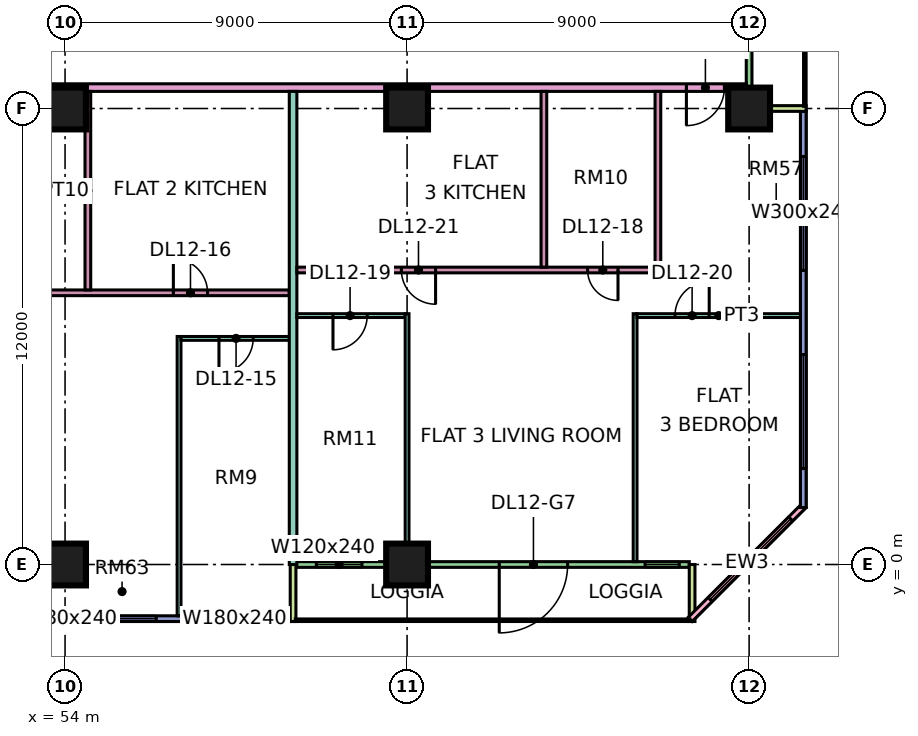
"""IFC4 building model, lengths in metres.
Left out: names, types, materials, properties, quantities, classifications, styles, units other than length and angle.
Written with IfcOpenShell. Run it as: python <this file> out.ifc"""

import sys

from ifc_helpers import new_model, si_unit, direction, frame, frame_2d, origin, origin_2d, place, context, subcontext, project, spatial, rectangle, extrude, element, fill, save


model = new_model("IFC4")
c1 = context("Model", 3, precision=1e-05, world=origin(), true_north=direction((0.0, 1.0)))
c2 = subcontext(c1, "Body", "Model", "MODEL_VIEW")
j1 = project(units=[si_unit("LENGTHUNIT", "METRE"), si_unit("PLANEANGLEUNIT", "RADIAN")], contexts=[c1])
p1 = place(None, origin())
s1 = spatial("IfcSite", under=j1, at=p1, CompositionType="ELEMENT")
p2 = place(p1, origin())
s2 = spatial("IfcBuilding", under=s1, at=p2, CompositionType="ELEMENT")
p3 = place(p2, frame((0.0, 0.0, 60.15)))
s3 = spatial("IfcBuildingStorey", under=s2, at=p3, CompositionType="ELEMENT", Elevation=60.15)
for number, where, z_axis, x_axis in (
    (1, (54.0, 0.0, 0.0), (0.0, 0.0, 1.0), (1.0, 0.0, 0.0)),
    (2, (54.0, 12.0, 0.0), (0.0, 0.0, 1.0), (1.0, 0.0, 0.0)),
    (3, (63.0, 0.0, 0.0), (0.0, 0.0, 1.0), (1.0, 0.0, 0.0)),
    (4, (63.0, 12.0, 0.0), (0.0, 0.0, 1.0), (1.0, 0.0, 0.0)),
    (5, (72.0, 12.0, 0.0), (0.0, 0.0, 1.0), (1.0, 0.0, 0.0)),
):
    element("IfcColumn", number, at=place(p3, frame(where, z_axis=z_axis, x_axis=x_axis)), inside=s3, PredefinedType="COLUMN", context=c2, shape_type="SweptSolid", body=[
        extrude(rectangle(XDim=1.1, YDim=1.1, at=origin_2d()), origin(), (0.0, 0.0, 1.0), 3.75),
    ])
p4 = place(p3, frame((48.075, -1.425, 0.0), z_axis=(0.0, 0.0, 1.0), x_axis=(1.0, 0.0, 0.0)))
e6 = element("IfcWall", 6, at=p4, inside=s3, PredefinedType="SOLIDWALL", context=c2, shape_type="SweptSolid", body=[
    extrude(rectangle(XDim=11.85, YDim=0.15, at=frame_2d((5.925, 0.0))), origin(), (0.0, 0.0, 1.0), 3.35),
])
p5 = place(p4, frame((0.562, 0.0, 0.45)))
e7 = element("IfcOpeningElement", 7, at=p5, cuts=e6, PredefinedType="OPENING", context=c2, shape_type="SweptSolid", body=[
    extrude(rectangle(XDim=1.8, YDim=2.4, at=frame_2d((0.9, 1.2))), frame((0.0, 0.085, 0.0), z_axis=(0.0, -1.0, 0.0), x_axis=(1.0, 0.0, 0.0)), (0.0, 0.0, 1.0), 0.17),
])
p6 = place(p4, frame((3.525, 0.0, 0.45)))
e8 = element("IfcOpeningElement", 8, at=p6, cuts=e6, PredefinedType="OPENING", context=c2, shape_type="SweptSolid", body=[
    extrude(rectangle(XDim=4.8, YDim=2.4, at=frame_2d((2.4, 1.2))), frame((0.0, 0.085, 0.0), z_axis=(0.0, -1.0, 0.0), x_axis=(1.0, 0.0, 0.0)), (0.0, 0.0, 1.0), 0.17),
])
p7 = place(p4, frame((9.488, 0.0, 0.45)))
e9 = element("IfcOpeningElement", 9, at=p7, cuts=e6, PredefinedType="OPENING", context=c2, shape_type="SweptSolid", body=[
    extrude(rectangle(XDim=1.8, YDim=2.4, at=frame_2d((0.9, 1.2))), frame((0.0, 0.085, 0.0), z_axis=(0.0, -1.0, 0.0), x_axis=(1.0, 0.0, 0.0)), (0.0, 0.0, 1.0), 0.17),
])
p8 = place(p3, frame((60.075, 0.0, 0.0), z_axis=(0.0, 0.0, 1.0), x_axis=(1.0, 0.0, 0.0)))
e10 = element("IfcWall", 10, at=p8, inside=s3, PredefinedType="SOLIDWALL", context=c2, shape_type="SweptSolid", body=[
    extrude(rectangle(XDim=10.35, YDim=0.15, at=frame_2d((5.175, 0.0))), origin(), (0.0, 0.0, 1.0), 3.35),
])
p9 = place(p8, frame((0.538, 0.0, 0.45)))
e11 = element("IfcOpeningElement", 11, at=p9, cuts=e10, PredefinedType="OPENING", context=c2, shape_type="SweptSolid", body=[
    extrude(rectangle(XDim=1.2, YDim=2.4, at=frame_2d((0.6, 1.2))), frame((0.0, 0.085, 0.0), z_axis=(0.0, -1.0, 0.0), x_axis=(1.0, 0.0, 0.0)), (0.0, 0.0, 1.0), 0.17),
])
p10 = place(p8, frame((5.35, 0.0, 0.0)))
e12 = element("IfcOpeningElement", 12, at=p10, cuts=e10, PredefinedType="OPENING", context=c2, shape_type="SweptSolid", body=[
    extrude(rectangle(XDim=1.8, YDim=2.4, at=frame_2d((0.9, 1.2))), frame((0.0, 0.085, 0.0), z_axis=(0.0, -1.0, 0.0), x_axis=(1.0, 0.0, 0.0)), (0.0, 0.0, 1.0), 0.17),
])
p11 = place(p8, frame((9.188, 0.0, 0.45)))
e13 = element("IfcOpeningElement", 13, at=p11, cuts=e10, PredefinedType="OPENING", context=c2, shape_type="SweptSolid", body=[
    extrude(rectangle(XDim=0.9, YDim=2.4, at=frame_2d((0.45, 1.2))), frame((0.0, 0.085, 0.0), z_axis=(0.0, -1.0, 0.0), x_axis=(1.0, 0.0, 0.0)), (0.0, 0.0, 1.0), 0.17),
])
for number, where, z_axis, x_axis in (
    (14, (60.0, -1.5, 0.0), (0.0, 0.0, 1.0), (0.0, 1.0, 0.0)),
    (15, (70.5, -1.5, 0.0), (0.0, 0.0, 1.0), (0.0, 1.0, 0.0)),
):
    element("IfcWall", number, at=place(p3, frame(where, z_axis=z_axis, x_axis=x_axis)), inside=s3, PredefinedType="SOLIDWALL", context=c2, shape_type="SweptSolid", body=[
        extrude(rectangle(XDim=1.5, YDim=0.15, at=frame_2d((0.75, 0.0))), origin(), (0.0, 0.0, 1.0), 3.35),
    ])
p12 = place(p3, frame((70.447, -1.447, 0.0), z_axis=(0.0, 0.0, 1.0), x_axis=(0.707106781187, 0.707106781187, 0.0)))
e16 = element("IfcWall", 16, at=p12, inside=s3, PredefinedType="SOLIDWALL", context=c2, shape_type="SweptSolid", body=[
    extrude(rectangle(XDim=4.243, YDim=0.15, at=frame_2d((2.121, 0.0))), origin(), (0.0, 0.0, 1.0), 3.35),
])
p13 = place(p12, frame((0.744, 0.0, 0.45)))
e17 = element("IfcOpeningElement", 17, at=p13, cuts=e16, PredefinedType="OPENING", context=c2, shape_type="SweptSolid", body=[
    extrude(rectangle(XDim=3.0, YDim=2.4, at=frame_2d((1.5, 1.2))), frame((0.0, 0.085, 0.0), z_axis=(0.0, -1.0, 0.0), x_axis=(1.0, 0.0, 0.0)), (0.0, 0.0, 1.0), 0.17),
])
p14 = place(p3, frame((73.425, 1.5, 0.0), z_axis=(0.0, 0.0, 1.0), x_axis=(0.0, 1.0, 0.0)))
e18 = element("IfcWall", 18, at=p14, inside=s3, PredefinedType="SOLIDWALL", context=c2, shape_type="SweptSolid", body=[
    extrude(rectangle(XDim=10.425, YDim=0.15, at=frame_2d((5.212, 0.0))), origin(), (0.0, 0.0, 1.0), 3.35),
])
p15 = place(p14, frame((1.025, 0.0, 0.45)))
e19 = element("IfcOpeningElement", 19, at=p15, cuts=e18, PredefinedType="OPENING", context=c2, shape_type="SweptSolid", body=[
    extrude(rectangle(XDim=3.0, YDim=2.4, at=frame_2d((1.5, 1.2))), frame((0.0, 0.085, 0.0), z_axis=(0.0, -1.0, 0.0), x_axis=(1.0, 0.0, 0.0)), (0.0, 0.0, 1.0), 0.17),
])
p16 = place(p14, frame((6.238, 0.0, 0.45)))
e20 = element("IfcOpeningElement", 20, at=p16, cuts=e18, PredefinedType="OPENING", context=c2, shape_type="SweptSolid", body=[
    extrude(rectangle(XDim=3.0, YDim=2.4, at=frame_2d((1.5, 1.2))), frame((0.0, 0.085, 0.0), z_axis=(0.0, -1.0, 0.0), x_axis=(1.0, 0.0, 0.0)), (0.0, 0.0, 1.0), 0.17),
])
p17 = place(p3, frame((72.0, 12.075, 0.0), z_axis=(0.0, 0.0, 1.0), x_axis=(0.0, 1.0, 0.0)))
e21 = element("IfcWall", 21, at=p17, inside=s3, PredefinedType="SOLIDWALL", context=c2, shape_type="SweptSolid", body=[
    extrude(rectangle(XDim=10.35, YDim=0.15, at=frame_2d((5.175, 0.0))), origin(), (0.0, 0.0, 1.0), 3.35),
])
p18 = place(p17, frame((4.275, 0.0, 1.7)))
e22 = element("IfcOpeningElement", 22, at=p18, cuts=e21, PredefinedType="OPENING", context=c2, shape_type="SweptSolid", body=[
    extrude(rectangle(XDim=1.2, YDim=0.9, at=frame_2d((0.6, 0.45))), frame((0.0, 0.085, 0.0), z_axis=(0.0, -1.0, 0.0), x_axis=(1.0, 0.0, 0.0)), (0.0, 0.0, 1.0), 0.17),
])
p19 = place(p17, frame((7.988, 0.0, 0.45)))
e23 = element("IfcOpeningElement", 23, at=p19, cuts=e21, PredefinedType="OPENING", context=c2, shape_type="SweptSolid", body=[
    extrude(rectangle(XDim=1.8, YDim=2.4, at=frame_2d((0.9, 1.2))), frame((0.0, 0.085, 0.0), z_axis=(0.0, -1.0, 0.0), x_axis=(1.0, 0.0, 0.0)), (0.0, 0.0, 1.0), 0.17),
])
p20 = place(p3, frame((73.5, 12.0, 0.0), z_axis=(0.0, 0.0, 1.0), x_axis=(-1.0, 0.0, 0.0)))
e24 = element("IfcWall", 24, at=p20, inside=s3, PredefinedType="SOLIDWALL", context=c2, shape_type="SweptSolid", body=[
    extrude(rectangle(XDim=1.5, YDim=0.15, at=frame_2d((0.75, 0.0))), origin(), (0.0, 0.0, 1.0), 3.35),
])
p21 = place(p3, frame((40.65, 12.55, 0.0), z_axis=(0.0, 0.0, 1.0), x_axis=(1.0, 0.0, 0.0)))
e25 = element("IfcWall", 25, at=p21, inside=s3, PredefinedType="PARTITIONING", context=c2, shape_type="SweptSolid", body=[
    extrude(rectangle(XDim=31.276, YDim=0.2, at=frame_2d((15.638, 0.0))), origin(), (0.0, 0.0, 1.0), 3.35),
])
p22 = place(p21, frame((8.4, 0.0, 0.0)))
e26 = element("IfcOpeningElement", 26, at=p22, cuts=e25, PredefinedType="OPENING", context=c2, shape_type="SweptSolid", body=[
    extrude(rectangle(XDim=1.0, YDim=2.1, at=frame_2d((0.5, 1.05))), frame((0.0, 0.11, 0.0), z_axis=(0.0, -1.0, 0.0), x_axis=(1.0, 0.0, 0.0)), (0.0, 0.0, 1.0), 0.22),
])
p23 = place(p21, frame((29.7, 0.0, 0.0)))
e27 = element("IfcOpeningElement", 27, at=p23, cuts=e25, PredefinedType="OPENING", context=c2, shape_type="SweptSolid", body=[
    extrude(rectangle(XDim=1.0, YDim=2.1, at=frame_2d((0.5, 1.05))), frame((0.0, 0.11, 0.0), z_axis=(0.0, -1.0, 0.0), x_axis=(1.0, 0.0, 0.0)), (0.0, 0.0, 1.0), 0.22),
])
p24 = place(p21, frame((1.05, 0.0, 0.0)))
e28 = element("IfcOpeningElement", 28, at=p24, cuts=e25, PredefinedType="OPENING", context=c2, shape_type="SweptSolid", body=[
    extrude(rectangle(XDim=1.0, YDim=2.1, at=frame_2d((0.5, 1.05))), frame((0.0, 0.11, 0.0), z_axis=(0.0, -1.0, 0.0), x_axis=(1.0, 0.0, 0.0)), (0.0, 0.0, 1.0), 0.22),
])
p25 = place(p3, frame((50.925, 7.15, 0.0), z_axis=(0.0, 0.0, 1.0), x_axis=(1.0, 0.0, 0.0)))
e29 = element("IfcWall", 29, at=p25, inside=s3, PredefinedType="PARTITIONING", context=c2, shape_type="SweptSolid", body=[
    extrude(rectangle(XDim=8.975, YDim=0.15, at=frame_2d((4.487, 0.0))), origin(), (0.0, 0.0, 1.0), 3.35),
])
p26 = place(p25, frame((5.925, 0.0, 0.0)))
e30 = element("IfcOpeningElement", 30, at=p26, cuts=e29, PredefinedType="OPENING", context=c2, shape_type="SweptSolid", body=[
    extrude(rectangle(XDim=0.9, YDim=2.1, at=frame_2d((0.45, 1.05))), frame((0.0, 0.085, 0.0), z_axis=(0.0, -1.0, 0.0), x_axis=(1.0, 0.0, 0.0)), (0.0, 0.0, 1.0), 0.17),
])
p27 = place(p3, frame((54.6, 7.225, 0.0), z_axis=(0.0, 0.0, 1.0), x_axis=(0.0, 1.0, 0.0)))
e31 = element("IfcWall", 31, at=p27, inside=s3, PredefinedType="PARTITIONING", context=c2, shape_type="SweptSolid", body=[
    extrude(rectangle(XDim=5.225, YDim=0.15, at=frame_2d((2.612, 0.0))), origin(), (0.0, 0.0, 1.0), 3.35),
])
p28 = place(p3, frame((57.0, -1.35, 0.0), z_axis=(0.0, 0.0, 1.0), x_axis=(0.0, 1.0, 0.0)))
e32 = element("IfcWall", 32, at=p28, inside=s3, PredefinedType="PARTITIONING", context=c2, shape_type="SweptSolid", body=[
    extrude(rectangle(XDim=7.35, YDim=0.1, at=frame_2d((3.675, 0.0))), origin(), (0.0, 0.0, 1.0), 3.35),
])
p29 = place(p3, frame((57.05, 5.95, 0.0), z_axis=(0.0, 0.0, 1.0), x_axis=(1.0, 0.0, 0.0)))
e33 = element("IfcWall", 33, at=p29, inside=s3, PredefinedType="PARTITIONING", context=c2, shape_type="SweptSolid", body=[
    extrude(rectangle(XDim=2.85, YDim=0.1, at=frame_2d((1.425, 0.0))), origin(), (0.0, 0.0, 1.0), 3.35),
])
p30 = place(p29, frame((1.0, 0.0, 0.0)))
e34 = element("IfcOpeningElement", 34, at=p30, cuts=e33, PredefinedType="OPENING", context=c2, shape_type="SweptSolid", body=[
    extrude(rectangle(XDim=0.9, YDim=2.1, at=frame_2d((0.45, 1.05))), frame((0.0, 0.06, 0.0), z_axis=(0.0, -1.0, 0.0), x_axis=(1.0, 0.0, 0.0)), (0.0, 0.0, 1.0), 0.12),
])
p31 = place(p3, frame((60.0, 0.0, 0.0), z_axis=(0.0, 0.0, 1.0), x_axis=(0.0, 1.0, 0.0)))
e35 = element("IfcWall", 35, at=p31, inside=s3, PredefinedType="PARTITIONING", context=c2, shape_type="SweptSolid", body=[
    extrude(rectangle(XDim=12.45, YDim=0.2, at=frame_2d((6.225, 0.0))), origin(), (0.0, 0.0, 1.0), 3.35),
])
p32 = place(p3, frame((60.1, 6.55, 0.0), z_axis=(0.0, 0.0, 1.0), x_axis=(1.0, 0.0, 0.0)))
e36 = element("IfcWall", 36, at=p32, inside=s3, PredefinedType="PARTITIONING", context=c2, shape_type="SweptSolid", body=[
    extrude(rectangle(XDim=2.85, YDim=0.1, at=frame_2d((1.425, 0.0))), origin(), (0.0, 0.0, 1.0), 3.35),
])
p33 = place(p32, frame((0.95, 0.0, 0.0)))
e37 = element("IfcOpeningElement", 37, at=p33, cuts=e36, PredefinedType="OPENING", context=c2, shape_type="SweptSolid", body=[
    extrude(rectangle(XDim=0.9, YDim=2.1, at=frame_2d((0.45, 1.05))), frame((0.0, 0.06, 0.0), z_axis=(0.0, -1.0, 0.0), x_axis=(1.0, 0.0, 0.0)), (0.0, 0.0, 1.0), 0.12),
])
p34 = place(p3, frame((60.1, 7.75, 0.0), z_axis=(0.0, 0.0, 1.0), x_axis=(1.0, 0.0, 0.0)))
e38 = element("IfcWall", 38, at=p34, inside=s3, PredefinedType="PARTITIONING", context=c2, shape_type="SweptSolid", body=[
    extrude(rectangle(XDim=9.575, YDim=0.15, at=frame_2d((4.788, 0.0))), origin(), (0.0, 0.0, 1.0), 3.35),
])
p35 = place(p34, frame((7.65, 0.0, 0.0)))
e39 = element("IfcOpeningElement", 39, at=p35, cuts=e38, PredefinedType="OPENING", context=c2, shape_type="SweptSolid", body=[
    extrude(rectangle(XDim=0.8, YDim=2.1, at=frame_2d((0.4, 1.05))), frame((0.0, 0.085, 0.0), z_axis=(0.0, -1.0, 0.0), x_axis=(1.0, 0.0, 0.0)), (0.0, 0.0, 1.0), 0.17),
])
p36 = place(p34, frame((2.75, 0.0, 0.0)))
e40 = element("IfcOpeningElement", 40, at=p36, cuts=e38, PredefinedType="OPENING", context=c2, shape_type="SweptSolid", body=[
    extrude(rectangle(XDim=0.9, YDim=2.1, at=frame_2d((0.45, 1.05))), frame((0.0, 0.085, 0.0), z_axis=(0.0, -1.0, 0.0), x_axis=(1.0, 0.0, 0.0)), (0.0, 0.0, 1.0), 0.17),
])
p37 = place(p3, frame((63.0, 0.074, 0.0), z_axis=(0.0, 0.0, 1.0), x_axis=(0.0, 1.0, 0.0)))
e41 = element("IfcWall", 41, at=p37, inside=s3, PredefinedType="PARTITIONING", context=c2, shape_type="SweptSolid", body=[
    extrude(rectangle(XDim=6.526, YDim=0.1, at=frame_2d((3.263, 0.0))), origin(), (0.0, 0.0, 1.0), 3.35),
])
p38 = place(p3, frame((66.6, 7.825, 0.0), z_axis=(0.0, 0.0, 1.0), x_axis=(0.0, 1.0, 0.0)))
e42 = element("IfcWall", 42, at=p38, inside=s3, PredefinedType="PARTITIONING", context=c2, shape_type="SweptSolid", body=[
    extrude(rectangle(XDim=4.625, YDim=0.15, at=frame_2d((2.312, 0.0))), origin(), (0.0, 0.0, 1.0), 3.35),
])
p39 = place(p3, frame((69.0, 0.074, 0.0), z_axis=(0.0, 0.0, 1.0), x_axis=(0.0, 1.0, 0.0)))
e43 = element("IfcWall", 43, at=p39, inside=s3, PredefinedType="PARTITIONING", context=c2, shape_type="SweptSolid", body=[
    extrude(rectangle(XDim=6.526, YDim=0.1, at=frame_2d((3.263, 0.0))), origin(), (0.0, 0.0, 1.0), 3.35),
])
p40 = place(p3, frame((69.05, 6.55, 0.0), z_axis=(0.0, 0.0, 1.0), x_axis=(1.0, 0.0, 0.0)))
e44 = element("IfcWall", 44, at=p40, inside=s3, PredefinedType="PARTITIONING", context=c2, shape_type="SweptSolid", body=[
    extrude(rectangle(XDim=4.3, YDim=0.1, at=frame_2d((2.15, 0.0))), origin(), (0.0, 0.0, 1.0), 3.35),
])
p41 = place(p40, frame((1.0, 0.0, 0.0)))
e45 = element("IfcOpeningElement", 45, at=p41, cuts=e44, PredefinedType="OPENING", context=c2, shape_type="SweptSolid", body=[
    extrude(rectangle(XDim=0.9, YDim=2.1, at=frame_2d((0.45, 1.05))), frame((0.0, 0.06, 0.0), z_axis=(0.0, -1.0, 0.0), x_axis=(1.0, 0.0, 0.0)), (0.0, 0.0, 1.0), 0.12),
])
p42 = place(p3, frame((69.6, 7.825, 0.0), z_axis=(0.0, 0.0, 1.0), x_axis=(0.0, 1.0, 0.0)))
e46 = element("IfcWall", 46, at=p42, inside=s3, PredefinedType="PARTITIONING", context=c2, shape_type="SweptSolid", body=[
    extrude(rectangle(XDim=4.625, YDim=0.15, at=frame_2d((2.312, 0.0))), origin(), (0.0, 0.0, 1.0), 3.35),
])
p43 = place(p6, origin())
e47 = element("IfcWindow", 47, at=p43, inside=s3, PartitioningType="SINGLE_PANEL", PredefinedType="WINDOW", context=c2, shape_type="SweptSolid", body=[
    extrude(rectangle(XDim=4.8, YDim=2.4, at=frame_2d((2.4, 1.2))), frame((0.0, 0.03, 0.0), z_axis=(0.0, -1.0, 0.0), x_axis=(1.0, 0.0, 0.0)), (0.0, 0.0, 1.0), 0.06),
])
fill(e8, e47)
p44 = place(p7, origin())
e48 = element("IfcWindow", 48, at=p44, inside=s3, PartitioningType="SINGLE_PANEL", PredefinedType="WINDOW", context=c2, shape_type="SweptSolid", body=[
    extrude(rectangle(XDim=1.8, YDim=2.4, at=frame_2d((0.9, 1.2))), frame((0.0, 0.03, 0.0), z_axis=(0.0, -1.0, 0.0), x_axis=(1.0, 0.0, 0.0)), (0.0, 0.0, 1.0), 0.06),
])
fill(e9, e48)
p45 = place(p9, origin())
e49 = element("IfcWindow", 49, at=p45, inside=s3, PartitioningType="SINGLE_PANEL", PredefinedType="WINDOW", context=c2, shape_type="SweptSolid", body=[
    extrude(rectangle(XDim=1.2, YDim=2.4, at=frame_2d((0.6, 1.2))), frame((0.0, 0.03, 0.0), z_axis=(0.0, -1.0, 0.0), x_axis=(1.0, 0.0, 0.0)), (0.0, 0.0, 1.0), 0.06),
])
fill(e11, e49)
p46 = place(p10, frame((1.8, 0.0, 0.0), z_axis=(0.0, 0.0, 1.0), x_axis=(-1.0, 0.0, 0.0)))
e50 = element("IfcDoor", 50, at=p46, inside=s3, OperationType="DOUBLE_DOOR_SINGLE_SWING", PredefinedType="DOOR", context=c2, shape_type="SweptSolid", body=[
    extrude(rectangle(XDim=1.8, YDim=2.4, at=frame_2d((0.9, 1.2))), frame((0.0, 0.025, 0.0), z_axis=(0.0, -1.0, 0.0), x_axis=(1.0, 0.0, 0.0)), (0.0, 0.0, 1.0), 0.05),
])
fill(e12, e50)
p47 = place(p11, origin())
e51 = element("IfcWindow", 51, at=p47, inside=s3, PartitioningType="SINGLE_PANEL", PredefinedType="WINDOW", context=c2, shape_type="SweptSolid", body=[
    extrude(rectangle(XDim=0.9, YDim=2.4, at=frame_2d((0.45, 1.2))), frame((0.0, 0.03, 0.0), z_axis=(0.0, -1.0, 0.0), x_axis=(1.0, 0.0, 0.0)), (0.0, 0.0, 1.0), 0.06),
])
fill(e13, e51)
p48 = place(p13, origin())
e52 = element("IfcWindow", 52, at=p48, inside=s3, PartitioningType="SINGLE_PANEL", PredefinedType="WINDOW", context=c2, shape_type="SweptSolid", body=[
    extrude(rectangle(XDim=3.0, YDim=2.4, at=frame_2d((1.5, 1.2))), frame((0.0, 0.03, 0.0), z_axis=(0.0, -1.0, 0.0), x_axis=(1.0, 0.0, 0.0)), (0.0, 0.0, 1.0), 0.06),
])
fill(e17, e52)
p49 = place(p15, origin())
e53 = element("IfcWindow", 53, at=p49, inside=s3, PartitioningType="SINGLE_PANEL", PredefinedType="WINDOW", context=c2, shape_type="SweptSolid", body=[
    extrude(rectangle(XDim=3.0, YDim=2.4, at=frame_2d((1.5, 1.2))), frame((0.0, 0.03, 0.0), z_axis=(0.0, -1.0, 0.0), x_axis=(1.0, 0.0, 0.0)), (0.0, 0.0, 1.0), 0.06),
])
fill(e19, e53)
p50 = place(p16, origin())
e54 = element("IfcWindow", 54, at=p50, inside=s3, PartitioningType="SINGLE_PANEL", PredefinedType="WINDOW", context=c2, shape_type="SweptSolid", body=[
    extrude(rectangle(XDim=3.0, YDim=2.4, at=frame_2d((1.5, 1.2))), frame((0.0, 0.03, 0.0), z_axis=(0.0, -1.0, 0.0), x_axis=(1.0, 0.0, 0.0)), (0.0, 0.0, 1.0), 0.06),
])
fill(e20, e54)
p51 = place(p30, frame((0.9, 0.0, 0.0), z_axis=(0.0, 0.0, 1.0), x_axis=(-1.0, 0.0, 0.0)))
e55 = element("IfcDoor", 55, at=p51, inside=s3, OperationType="SINGLE_SWING_LEFT", PredefinedType="DOOR", context=c2, shape_type="SweptSolid", body=[
    extrude(rectangle(XDim=0.9, YDim=2.1, at=frame_2d((0.45, 1.05))), frame((0.0, 0.025, 0.0), z_axis=(0.0, -1.0, 0.0), x_axis=(1.0, 0.0, 0.0)), (0.0, 0.0, 1.0), 0.05),
])
fill(e34, e55)
p52 = place(p26, origin())
e56 = element("IfcDoor", 56, at=p52, inside=s3, OperationType="SINGLE_SWING_LEFT", PredefinedType="DOOR", context=c2, shape_type="SweptSolid", body=[
    extrude(rectangle(XDim=0.9, YDim=2.1, at=frame_2d((0.45, 1.05))), frame((0.0, 0.025, 0.0), z_axis=(0.0, -1.0, 0.0), x_axis=(1.0, 0.0, 0.0)), (0.0, 0.0, 1.0), 0.05),
])
fill(e30, e56)
p53 = place(p35, origin())
e57 = element("IfcDoor", 57, at=p53, inside=s3, OperationType="SINGLE_SWING_RIGHT", PredefinedType="DOOR", context=c2, shape_type="SweptSolid", body=[
    extrude(rectangle(XDim=0.8, YDim=2.1, at=frame_2d((0.4, 1.05))), frame((0.0, 0.025, 0.0), z_axis=(0.0, -1.0, 0.0), x_axis=(1.0, 0.0, 0.0)), (0.0, 0.0, 1.0), 0.05),
])
fill(e39, e57)
p54 = place(p33, frame((0.9, 0.0, 0.0), z_axis=(0.0, 0.0, 1.0), x_axis=(-1.0, 0.0, 0.0)))
e58 = element("IfcDoor", 58, at=p54, inside=s3, OperationType="SINGLE_SWING_LEFT", PredefinedType="DOOR", context=c2, shape_type="SweptSolid", body=[
    extrude(rectangle(XDim=0.9, YDim=2.1, at=frame_2d((0.45, 1.05))), frame((0.0, 0.025, 0.0), z_axis=(0.0, -1.0, 0.0), x_axis=(1.0, 0.0, 0.0)), (0.0, 0.0, 1.0), 0.05),
])
fill(e37, e58)
p55 = place(p41, frame((0.9, 0.0, 0.0), z_axis=(0.0, 0.0, 1.0), x_axis=(-1.0, 0.0, 0.0)))
e59 = element("IfcDoor", 59, at=p55, inside=s3, OperationType="SINGLE_SWING_RIGHT", PredefinedType="DOOR", context=c2, shape_type="SweptSolid", body=[
    extrude(rectangle(XDim=0.9, YDim=2.1, at=frame_2d((0.45, 1.05))), frame((0.0, 0.025, 0.0), z_axis=(0.0, -1.0, 0.0), x_axis=(1.0, 0.0, 0.0)), (0.0, 0.0, 1.0), 0.05),
])
fill(e45, e59)
p56 = place(p36, origin())
e60 = element("IfcDoor", 60, at=p56, inside=s3, OperationType="SINGLE_SWING_RIGHT", PredefinedType="DOOR", context=c2, shape_type="SweptSolid", body=[
    extrude(rectangle(XDim=0.9, YDim=2.1, at=frame_2d((0.45, 1.05))), frame((0.0, 0.025, 0.0), z_axis=(0.0, -1.0, 0.0), x_axis=(1.0, 0.0, 0.0)), (0.0, 0.0, 1.0), 0.05),
])
fill(e40, e60)
p57 = place(p23, frame((1.0, 0.0, 0.0), z_axis=(0.0, 0.0, 1.0), x_axis=(-1.0, 0.0, 0.0)))
e61 = element("IfcDoor", 61, at=p57, inside=s3, OperationType="SINGLE_SWING_LEFT", PredefinedType="DOOR", context=c2, shape_type="SweptSolid", body=[
    extrude(rectangle(XDim=1.0, YDim=2.1, at=frame_2d((0.5, 1.05))), frame((0.0, 0.025, 0.0), z_axis=(0.0, -1.0, 0.0), x_axis=(1.0, 0.0, 0.0)), (0.0, 0.0, 1.0), 0.05),
])
fill(e27, e61)
save(model, sys.argv[1])
